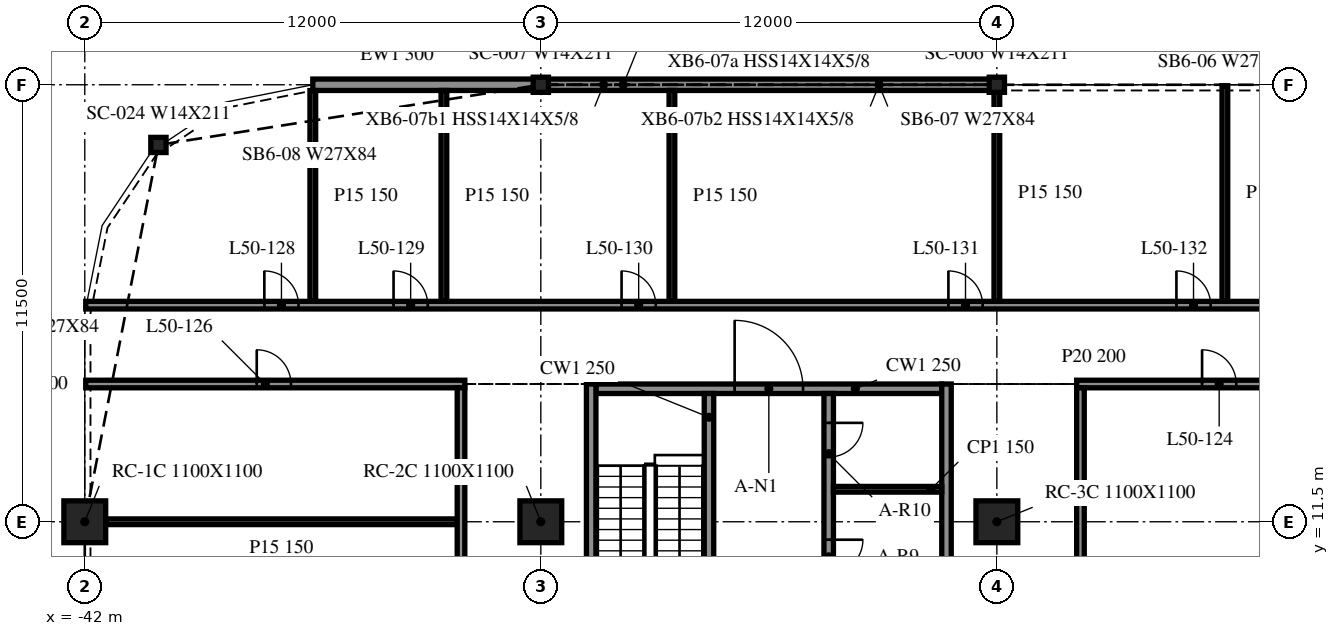
"""IFC4 building model, lengths in metres.
Left out: names, types, materials, properties, quantities, classifications, styles, units other than length and angle.
Written with IfcOpenShell. Run it as: python <this file> out.ifc"""

import sys

from ifc_helpers import new_model, si_unit, direction, frame, frame_2d, origin, origin_2d, place, context, subcontext, project, spatial, rectangle, i_section, extrude, element, fill, save


model = new_model("IFC4")
c1 = context("Model", 3, precision=1e-05, world=origin(), true_north=direction((0.0, 1.0)))
c2 = subcontext(c1, "Body", "Model", "MODEL_VIEW")
j1 = project(units=[si_unit("LENGTHUNIT", "METRE"), si_unit("PLANEANGLEUNIT", "RADIAN")], contexts=[c1])
p1 = place(None, origin())
s1 = spatial("IfcSite", under=j1, at=p1, CompositionType="ELEMENT")
p2 = place(p1, origin())
s2 = spatial("IfcBuilding", under=s1, at=p2, CompositionType="ELEMENT")
p3 = place(p2, frame((0.0, 0.0, 209.1)))
s3 = spatial("IfcBuildingStorey", under=s2, at=p3, CompositionType="ELEMENT", Elevation=209.1)
for number, where, z_axis, x_axis in (
    (1, (-42.0, 11.5, -0.34), (0.0, 0.0, 1.0), (1.0, 0.0, 0.0)),
    (2, (-30.0, 11.5, -0.34), (0.0, 0.0, 1.0), (1.0, 0.0, 0.0)),
    (3, (-18.0, 11.5, -0.34), (0.0, 0.0, 1.0), (1.0, 0.0, 0.0)),
):
    element("IfcColumn", number, at=place(p3, frame(where, z_axis=z_axis, x_axis=x_axis)), inside=s3, PredefinedType="COLUMN", context=c2, shape_type="SweptSolid", body=[
        extrude(rectangle(XDim=1.1, YDim=1.1, at=origin_2d()), origin(), (0.0, 0.0, 1.0), 3.8),
    ])
for number, where, z_axis, x_axis in (
    (4, (-18.0, 23.0, -0.34), (0.0, 0.0, 1.0), (1.0, 0.0, 0.0)),
    (5, (-30.0, 23.0, -0.34), (0.0, 0.0, 1.0), (1.0, 0.0, 0.0)),
    (6, (-40.062, 21.416, -0.34), (0.0, 0.0, 1.0), (1.0, 0.0, 0.0)),
):
    element("IfcColumn", number, at=place(p3, frame(where, z_axis=z_axis, x_axis=x_axis)), inside=s3, PredefinedType="COLUMN", context=c2, shape_type="SweptSolid", body=[
        extrude(i_section(OverallWidth=0.401, OverallDepth=0.399, WebThickness=0.025, FlangeThickness=0.04, at=origin_2d()), origin(), (0.0, 0.0, 1.0), 3.8),
    ])
p4 = place(p3, frame((-18.012, 23.0, 0.0), z_axis=(0.0, 0.0, 1.0), x_axis=(-1.0, 0.0, 0.0)))
e7 = element("IfcWall", 7, at=p4, inside=s3, PredefinedType="NOTDEFINED", context=c2, shape_type="SweptSolid", body=[
    extrude(rectangle(XDim=11.975, YDim=0.3, at=frame_2d((5.988, 0.0))), origin(), (0.0, 0.0, 1.0), 2.782),
])
p5 = place(p3, frame((-30.012, 23.0, 0.0), z_axis=(0.0, 0.0, 1.0), x_axis=(-1.0, 0.0, 0.0)))
e8 = element("IfcWall", 8, at=p5, inside=s3, PredefinedType="NOTDEFINED", context=c2, shape_type="SweptSolid", body=[
    extrude(rectangle(XDim=5.988, YDim=0.3, at=frame_2d((2.994, 0.0))), origin(), (0.0, 0.0, 1.0), 2.782),
])
for number, where, z_axis, x_axis in (
    (9, (-28.675, 15.125, 0.0), (0.0, 0.0, 1.0), (0.0, -1.0, 0.0)),
    (10, (-19.325, -9.125, 0.0), (0.0, 0.0, 1.0), (0.0, 1.0, 0.0)),
):
    element("IfcWall", number, at=place(p3, frame(where, z_axis=z_axis, x_axis=x_axis)), inside=s3, PredefinedType="SOLIDWALL", context=c2, shape_type="SweptSolid", body=[
        extrude(rectangle(XDim=24.25, YDim=0.25, at=frame_2d((12.125, 0.0))), origin(), (0.0, 0.0, 1.0), 3.46),
    ])
p6 = place(p3, frame((-28.55, 15.0, 0.0), z_axis=(0.0, 0.0, 1.0), x_axis=(1.0, 0.0, 0.0)))
e11 = element("IfcWall", 11, at=p6, inside=s3, PredefinedType="SOLIDWALL", context=c2, shape_type="SweptSolid", body=[
    extrude(rectangle(XDim=9.1, YDim=0.25, at=frame_2d((4.55, 0.0))), origin(), (0.0, 0.0, 1.0), 3.46),
])
p7 = place(p6, frame((3.65, 0.0, 0.0)))
e12 = element("IfcOpeningElement", 12, at=p7, cuts=e11, PredefinedType="OPENING", context=c2, shape_type="SweptSolid", body=[
    extrude(rectangle(XDim=1.8, YDim=2.1, at=frame_2d((0.9, 1.05))), frame((0.0, 0.135, 0.0), z_axis=(0.0, -1.0, 0.0), x_axis=(1.0, 0.0, 0.0)), (0.0, 0.0, 1.0), 0.27),
])
p8 = place(p3, frame((-25.575, 14.875, 0.0), z_axis=(0.0, 0.0, 1.0), x_axis=(0.0, -1.0, 0.0)))
e13 = element("IfcWall", 13, at=p8, inside=s3, PredefinedType="SOLIDWALL", context=c2, shape_type="SweptSolid", body=[
    extrude(rectangle(XDim=6.25, YDim=0.25, at=frame_2d((3.125, 0.0))), origin(), (0.0, 0.0, 1.0), 3.46),
])
p9 = place(p8, frame((4.85, 0.0, 0.0)))
e14 = element("IfcOpeningElement", 14, at=p9, cuts=e13, PredefinedType="OPENING", context=c2, shape_type="SweptSolid", body=[
    extrude(rectangle(XDim=1.0, YDim=2.1, at=frame_2d((0.5, 1.05))), frame((0.0, 0.135, 0.0), z_axis=(0.0, -1.0, 0.0), x_axis=(1.0, 0.0, 0.0)), (0.0, 0.0, 1.0), 0.27),
])
p10 = place(p3, frame((-22.425, 14.875, 0.0), z_axis=(0.0, 0.0, 1.0), x_axis=(0.0, -1.0, 0.0)))
e15 = element("IfcWall", 15, at=p10, inside=s3, PredefinedType="SOLIDWALL", context=c2, shape_type="SweptSolid", body=[
    extrude(rectangle(XDim=23.75, YDim=0.25, at=frame_2d((11.875, 0.0))), origin(), (0.0, 0.0, 1.0), 3.46),
])
p11 = place(p10, frame((15.225, 0.0, 0.0)))
e16 = element("IfcOpeningElement", 16, at=p11, cuts=e15, PredefinedType="OPENING", context=c2, shape_type="SweptSolid", body=[
    extrude(rectangle(XDim=0.9, YDim=2.1, at=frame_2d((0.45, 1.05))), frame((0.0, 0.135, 0.0), z_axis=(0.0, -1.0, 0.0), x_axis=(1.0, 0.0, 0.0)), (0.0, 0.0, 1.0), 0.27),
])
p12 = place(p10, frame((11.425, 0.0, 0.0)))
e17 = element("IfcOpeningElement", 17, at=p12, cuts=e15, PredefinedType="OPENING", context=c2, shape_type="SweptSolid", body=[
    extrude(rectangle(XDim=0.9, YDim=2.1, at=frame_2d((0.45, 1.05))), frame((0.0, 0.135, 0.0), z_axis=(0.0, -1.0, 0.0), x_axis=(1.0, 0.0, 0.0)), (0.0, 0.0, 1.0), 0.27),
])
p13 = place(p10, frame((7.625, 0.0, 0.0)))
e18 = element("IfcOpeningElement", 18, at=p13, cuts=e15, PredefinedType="OPENING", context=c2, shape_type="SweptSolid", body=[
    extrude(rectangle(XDim=0.9, YDim=2.1, at=frame_2d((0.45, 1.05))), frame((0.0, 0.135, 0.0), z_axis=(0.0, -1.0, 0.0), x_axis=(1.0, 0.0, 0.0)), (0.0, 0.0, 1.0), 0.27),
])
p14 = place(p10, frame((20.3, 0.0, 0.0)))
e19 = element("IfcOpeningElement", 19, at=p14, cuts=e15, PredefinedType="OPENING", context=c2, shape_type="SweptSolid", body=[
    extrude(rectangle(XDim=0.9, YDim=2.1, at=frame_2d((0.45, 1.05))), frame((0.0, 0.135, 0.0), z_axis=(0.0, -1.0, 0.0), x_axis=(1.0, 0.0, 0.0)), (0.0, 0.0, 1.0), 0.27),
])
p15 = place(p10, frame((3.847, 0.0, 0.0)))
e20 = element("IfcOpeningElement", 20, at=p15, cuts=e15, PredefinedType="OPENING", context=c2, shape_type="SweptSolid", body=[
    extrude(rectangle(XDim=0.9, YDim=2.1, at=frame_2d((0.45, 1.05))), frame((0.0, 0.135, 0.0), z_axis=(0.0, -1.0, 0.0), x_axis=(1.0, 0.0, 0.0)), (0.0, 0.0, 1.0), 0.27),
])
p16 = place(p10, frame((0.772, 0.0, 0.0)))
e21 = element("IfcOpeningElement", 21, at=p16, cuts=e15, PredefinedType="OPENING", context=c2, shape_type="SweptSolid", body=[
    extrude(rectangle(XDim=0.9, YDim=2.1, at=frame_2d((0.45, 1.05))), frame((0.0, 0.135, 0.0), z_axis=(0.0, -1.0, 0.0), x_axis=(1.0, 0.0, 0.0)), (0.0, 0.0, 1.0), 0.27),
])
p17 = place(p3, frame((-22.3, 12.355, 0.0), z_axis=(0.0, 0.0, 1.0), x_axis=(1.0, 0.0, 0.0)))
e22 = element("IfcWall", 22, at=p17, inside=s3, PredefinedType="PARTITIONING", context=c2, shape_type="SweptSolid", body=[
    extrude(rectangle(XDim=2.85, YDim=0.15, at=frame_2d((1.425, 0.0))), origin(), (0.0, 0.0, 1.0), 3.46),
])
p18 = place(p3, frame((-41.45, 11.5, 0.0), z_axis=(0.0, 0.0, 1.0), x_axis=(1.0, 0.0, 0.0)))
e23 = element("IfcWall", 23, at=p18, inside=s3, PredefinedType="PARTITIONING", context=c2, shape_type="SweptSolid", body=[
    extrude(rectangle(XDim=9.25, YDim=0.15, at=frame_2d((4.625, 0.0))), origin(), (0.0, 0.0, 1.0), 3.46),
])
p19 = place(p3, frame((-41.975, 15.125, 0.0), z_axis=(0.0, 0.0, 1.0), x_axis=(1.0, 0.0, 0.0)))
e24 = element("IfcWall", 24, at=p19, inside=s3, PredefinedType="PARTITIONING", context=c2, shape_type="SweptSolid", body=[
    extrude(rectangle(XDim=9.975, YDim=0.2, at=frame_2d((4.988, 0.0))), origin(), (0.0, 0.0, 1.0), 3.46),
])
p20 = place(p19, frame((4.5, 0.0, 0.0)))
e25 = element("IfcOpeningElement", 25, at=p20, cuts=e24, PredefinedType="OPENING", context=c2, shape_type="SweptSolid", body=[
    extrude(rectangle(XDim=0.9, YDim=2.1, at=frame_2d((0.45, 1.05))), frame((0.0, 0.11, 0.0), z_axis=(0.0, -1.0, 0.0), x_axis=(1.0, 0.0, 0.0)), (0.0, 0.0, 1.0), 0.22),
])
p21 = place(p3, frame((-15.9, 15.125, 0.0), z_axis=(0.0, 0.0, 1.0), x_axis=(1.0, 0.0, 0.0)))
e26 = element("IfcWall", 26, at=p21, inside=s3, PredefinedType="PARTITIONING", context=c2, shape_type="SweptSolid", body=[
    extrude(rectangle(XDim=7.7, YDim=0.2, at=frame_2d((3.85, 0.0))), origin(), (0.0, 0.0, 1.0), 3.46),
])
p22 = place(p21, frame((3.3, 0.0, 0.0)))
e27 = element("IfcOpeningElement", 27, at=p22, cuts=e26, PredefinedType="OPENING", context=c2, shape_type="SweptSolid", body=[
    extrude(rectangle(XDim=0.9, YDim=2.1, at=frame_2d((0.45, 1.05))), frame((0.0, 0.11, 0.0), z_axis=(0.0, -1.0, 0.0), x_axis=(1.0, 0.0, 0.0)), (0.0, 0.0, 1.0), 0.22),
])
p23 = place(p3, frame((-41.975, 17.2, 0.0), z_axis=(0.0, 0.0, 1.0), x_axis=(1.0, 0.0, 0.0)))
e28 = element("IfcWall", 28, at=p23, inside=s3, PredefinedType="PARTITIONING", context=c2, shape_type="SweptSolid", body=[
    extrude(rectangle(XDim=95.782, YDim=0.2, at=frame_2d((47.891, 0.0))), origin(), (0.0, 0.0, 1.0), 3.46),
])
p24 = place(p23, frame((4.7, 0.0, 0.0)))
e29 = element("IfcOpeningElement", 29, at=p24, cuts=e28, PredefinedType="OPENING", context=c2, shape_type="SweptSolid", body=[
    extrude(rectangle(XDim=0.9, YDim=2.1, at=frame_2d((0.45, 1.05))), frame((0.0, 0.11, 0.0), z_axis=(0.0, -1.0, 0.0), x_axis=(1.0, 0.0, 0.0)), (0.0, 0.0, 1.0), 0.22),
])
p25 = place(p23, frame((8.1, 0.0, 0.0)))
e30 = element("IfcOpeningElement", 30, at=p25, cuts=e28, PredefinedType="OPENING", context=c2, shape_type="SweptSolid", body=[
    extrude(rectangle(XDim=0.9, YDim=2.1, at=frame_2d((0.45, 1.05))), frame((0.0, 0.11, 0.0), z_axis=(0.0, -1.0, 0.0), x_axis=(1.0, 0.0, 0.0)), (0.0, 0.0, 1.0), 0.22),
])
p26 = place(p23, frame((14.1, 0.0, 0.0)))
e31 = element("IfcOpeningElement", 31, at=p26, cuts=e28, PredefinedType="OPENING", context=c2, shape_type="SweptSolid", body=[
    extrude(rectangle(XDim=0.9, YDim=2.1, at=frame_2d((0.45, 1.05))), frame((0.0, 0.11, 0.0), z_axis=(0.0, -1.0, 0.0), x_axis=(1.0, 0.0, 0.0)), (0.0, 0.0, 1.0), 0.22),
])
p27 = place(p23, frame((22.7, 0.0, 0.0)))
e32 = element("IfcOpeningElement", 32, at=p27, cuts=e28, PredefinedType="OPENING", context=c2, shape_type="SweptSolid", body=[
    extrude(rectangle(XDim=0.9, YDim=2.1, at=frame_2d((0.45, 1.05))), frame((0.0, 0.11, 0.0), z_axis=(0.0, -1.0, 0.0), x_axis=(1.0, 0.0, 0.0)), (0.0, 0.0, 1.0), 0.22),
])
p28 = place(p23, frame((28.7, 0.0, 0.0)))
e33 = element("IfcOpeningElement", 33, at=p28, cuts=e28, PredefinedType="OPENING", context=c2, shape_type="SweptSolid", body=[
    extrude(rectangle(XDim=0.9, YDim=2.1, at=frame_2d((0.45, 1.05))), frame((0.0, 0.11, 0.0), z_axis=(0.0, -1.0, 0.0), x_axis=(1.0, 0.0, 0.0)), (0.0, 0.0, 1.0), 0.22),
])
p29 = place(p23, frame((34.7, 0.0, 0.0)))
e34 = element("IfcOpeningElement", 34, at=p29, cuts=e28, PredefinedType="OPENING", context=c2, shape_type="SweptSolid", body=[
    extrude(rectangle(XDim=0.9, YDim=2.1, at=frame_2d((0.45, 1.05))), frame((0.0, 0.11, 0.0), z_axis=(0.0, -1.0, 0.0), x_axis=(1.0, 0.0, 0.0)), (0.0, 0.0, 1.0), 0.22),
])
p30 = place(p23, frame((38.1, 0.0, 0.0)))
e35 = element("IfcOpeningElement", 35, at=p30, cuts=e28, PredefinedType="OPENING", context=c2, shape_type="SweptSolid", body=[
    extrude(rectangle(XDim=0.9, YDim=2.1, at=frame_2d((0.45, 1.05))), frame((0.0, 0.11, 0.0), z_axis=(0.0, -1.0, 0.0), x_axis=(1.0, 0.0, 0.0)), (0.0, 0.0, 1.0), 0.22),
])
p31 = place(p23, frame((43.7, 0.0, 0.0)))
e36 = element("IfcOpeningElement", 36, at=p31, cuts=e28, PredefinedType="OPENING", context=c2, shape_type="SweptSolid", body=[
    extrude(rectangle(XDim=0.9, YDim=2.1, at=frame_2d((0.45, 1.05))), frame((0.0, 0.11, 0.0), z_axis=(0.0, -1.0, 0.0), x_axis=(1.0, 0.0, 0.0)), (0.0, 0.0, 1.0), 0.22),
])
p32 = place(p23, frame((47.3, 0.0, 0.0)))
e37 = element("IfcOpeningElement", 37, at=p32, cuts=e28, PredefinedType="OPENING", context=c2, shape_type="SweptSolid", body=[
    extrude(rectangle(XDim=0.9, YDim=2.1, at=frame_2d((0.45, 1.05))), frame((0.0, 0.11, 0.0), z_axis=(0.0, -1.0, 0.0), x_axis=(1.0, 0.0, 0.0)), (0.0, 0.0, 1.0), 0.22),
])
p33 = place(p23, frame((54.1, 0.0, 0.0)))
e38 = element("IfcOpeningElement", 38, at=p33, cuts=e28, PredefinedType="OPENING", context=c2, shape_type="SweptSolid", body=[
    extrude(rectangle(XDim=0.9, YDim=2.1, at=frame_2d((0.45, 1.05))), frame((0.0, 0.11, 0.0), z_axis=(0.0, -1.0, 0.0), x_axis=(1.0, 0.0, 0.0)), (0.0, 0.0, 1.0), 0.22),
])
p34 = place(p23, frame((60.1, 0.0, 0.0)))
e39 = element("IfcOpeningElement", 39, at=p34, cuts=e28, PredefinedType="OPENING", context=c2, shape_type="SweptSolid", body=[
    extrude(rectangle(XDim=0.9, YDim=2.1, at=frame_2d((0.45, 1.05))), frame((0.0, 0.11, 0.0), z_axis=(0.0, -1.0, 0.0), x_axis=(1.0, 0.0, 0.0)), (0.0, 0.0, 1.0), 0.22),
])
p35 = place(p23, frame((66.1, 0.0, 0.0)))
e40 = element("IfcOpeningElement", 40, at=p35, cuts=e28, PredefinedType="OPENING", context=c2, shape_type="SweptSolid", body=[
    extrude(rectangle(XDim=0.9, YDim=2.1, at=frame_2d((0.45, 1.05))), frame((0.0, 0.11, 0.0), z_axis=(0.0, -1.0, 0.0), x_axis=(1.0, 0.0, 0.0)), (0.0, 0.0, 1.0), 0.22),
])
p36 = place(p23, frame((69.5, 0.0, 0.0)))
e41 = element("IfcOpeningElement", 41, at=p36, cuts=e28, PredefinedType="OPENING", context=c2, shape_type="SweptSolid", body=[
    extrude(rectangle(XDim=0.9, YDim=2.1, at=frame_2d((0.45, 1.05))), frame((0.0, 0.11, 0.0), z_axis=(0.0, -1.0, 0.0), x_axis=(1.0, 0.0, 0.0)), (0.0, 0.0, 1.0), 0.22),
])
p37 = place(p23, frame((75.1, 0.0, 0.0)))
e42 = element("IfcOpeningElement", 42, at=p37, cuts=e28, PredefinedType="OPENING", context=c2, shape_type="SweptSolid", body=[
    extrude(rectangle(XDim=0.9, YDim=2.1, at=frame_2d((0.45, 1.05))), frame((0.0, 0.11, 0.0), z_axis=(0.0, -1.0, 0.0), x_axis=(1.0, 0.0, 0.0)), (0.0, 0.0, 1.0), 0.22),
])
p38 = place(p23, frame((84.1, 0.0, 0.0)))
e43 = element("IfcOpeningElement", 43, at=p38, cuts=e28, PredefinedType="OPENING", context=c2, shape_type="SweptSolid", body=[
    extrude(rectangle(XDim=0.9, YDim=2.1, at=frame_2d((0.45, 1.05))), frame((0.0, 0.11, 0.0), z_axis=(0.0, -1.0, 0.0), x_axis=(1.0, 0.0, 0.0)), (0.0, 0.0, 1.0), 0.22),
])
p39 = place(p23, frame((90.1, 0.0, 0.0)))
e44 = element("IfcOpeningElement", 44, at=p39, cuts=e28, PredefinedType="OPENING", context=c2, shape_type="SweptSolid", body=[
    extrude(rectangle(XDim=0.9, YDim=2.1, at=frame_2d((0.45, 1.05))), frame((0.0, 0.11, 0.0), z_axis=(0.0, -1.0, 0.0), x_axis=(1.0, 0.0, 0.0)), (0.0, 0.0, 1.0), 0.22),
])
p40 = place(p3, frame((-36.0, 17.3, 0.0), z_axis=(0.0, 0.0, 1.0), x_axis=(0.0, 1.0, 0.0)))
e45 = element("IfcWall", 45, at=p40, inside=s3, PredefinedType="PARTITIONING", context=c2, shape_type="SweptSolid", body=[
    extrude(rectangle(XDim=5.547, YDim=0.15, at=frame_2d((2.773, 0.0))), origin(), (0.0, 0.0, 1.0), 3.46),
])
p41 = place(p3, frame((-32.55, 17.3, 0.0), z_axis=(0.0, 0.0, 1.0), x_axis=(0.0, 1.0, 0.0)))
e46 = element("IfcWall", 46, at=p41, inside=s3, PredefinedType="PARTITIONING", context=c2, shape_type="SweptSolid", body=[
    extrude(rectangle(XDim=5.55, YDim=0.15, at=frame_2d((2.775, 0.0))), origin(), (0.0, 0.0, 1.0), 3.46),
])
p42 = place(p3, frame((-32.1, -9.025, 0.0), z_axis=(0.0, 0.0, 1.0), x_axis=(0.0, 1.0, 0.0)))
e47 = element("IfcWall", 47, at=p42, inside=s3, PredefinedType="PARTITIONING", context=c2, shape_type="SweptSolid", body=[
    extrude(rectangle(XDim=24.05, YDim=0.2, at=frame_2d((12.025, 0.0))), origin(), (0.0, 0.0, 1.0), 3.46),
])
p43 = place(p42, frame((11.5, 0.0, 0.0)))
e48 = element("IfcOpeningElement", 48, at=p43, cuts=e47, PredefinedType="OPENING", context=c2, shape_type="SweptSolid", body=[
    extrude(rectangle(XDim=1.0, YDim=2.1, at=frame_2d((0.5, 1.05))), frame((0.0, 0.11, 0.0), z_axis=(0.0, -1.0, 0.0), x_axis=(1.0, 0.0, 0.0)), (0.0, 0.0, 1.0), 0.22),
])
p44 = place(p3, frame((-26.55, 17.3, 0.0), z_axis=(0.0, 0.0, 1.0), x_axis=(0.0, 1.0, 0.0)))
e49 = element("IfcWall", 49, at=p44, inside=s3, PredefinedType="PARTITIONING", context=c2, shape_type="SweptSolid", body=[
    extrude(rectangle(XDim=5.55, YDim=0.15, at=frame_2d((2.775, 0.0))), origin(), (0.0, 0.0, 1.0), 3.46),
])
p45 = place(p3, frame((-18.0, 17.3, 0.0), z_axis=(0.0, 0.0, 1.0), x_axis=(0.0, 1.0, 0.0)))
e50 = element("IfcWall", 50, at=p45, inside=s3, PredefinedType="PARTITIONING", context=c2, shape_type="SweptSolid", body=[
    extrude(rectangle(XDim=5.675, YDim=0.15, at=frame_2d((2.837, 0.0))), origin(), (0.0, 0.0, 1.0), 3.46),
])
p46 = place(p3, frame((-15.8, -9.025, 0.0), z_axis=(0.0, 0.0, 1.0), x_axis=(0.0, 1.0, 0.0)))
e51 = element("IfcWall", 51, at=p46, inside=s3, PredefinedType="PARTITIONING", context=c2, shape_type="SweptSolid", body=[
    extrude(rectangle(XDim=24.05, YDim=0.2, at=frame_2d((12.025, 0.0))), origin(), (0.0, 0.0, 1.0), 3.46),
])
p47 = place(p46, frame((11.5, 0.0, 0.0)))
e52 = element("IfcOpeningElement", 52, at=p47, cuts=e51, PredefinedType="OPENING", context=c2, shape_type="SweptSolid", body=[
    extrude(rectangle(XDim=0.9, YDim=2.1, at=frame_2d((0.45, 1.05))), frame((0.0, 0.11, 0.0), z_axis=(0.0, -1.0, 0.0), x_axis=(1.0, 0.0, 0.0)), (0.0, 0.0, 1.0), 0.22),
])
p48 = place(p3, frame((-12.0, 17.3, 0.0), z_axis=(0.0, 0.0, 1.0), x_axis=(0.0, 1.0, 0.0)))
e53 = element("IfcWall", 53, at=p48, inside=s3, PredefinedType="PARTITIONING", context=c2, shape_type="SweptSolid", body=[
    extrude(rectangle(XDim=5.675, YDim=0.15, at=frame_2d((2.837, 0.0))), origin(), (0.0, 0.0, 1.0), 3.46),
])
p49 = place(p7, origin())
e54 = element("IfcDoor", 54, at=p49, inside=s3, OperationType="DOUBLE_DOOR_SINGLE_SWING", PredefinedType="DOOR", context=c2, shape_type="SweptSolid", body=[
    extrude(rectangle(XDim=1.8, YDim=2.1, at=frame_2d((0.9, 1.05))), frame((0.0, 0.025, 0.0), z_axis=(0.0, -1.0, 0.0), x_axis=(1.0, 0.0, 0.0)), (0.0, 0.0, 1.0), 0.05),
])
fill(e12, e54)
p50 = place(p15, origin())
e55 = element("IfcDoor", 55, at=p50, inside=s3, OperationType="SINGLE_SWING_LEFT", PredefinedType="DOOR", context=c2, shape_type="SweptSolid", body=[
    extrude(rectangle(XDim=0.9, YDim=2.1, at=frame_2d((0.45, 1.05))), frame((0.0, 0.025, 0.0), z_axis=(0.0, -1.0, 0.0), x_axis=(1.0, 0.0, 0.0)), (0.0, 0.0, 1.0), 0.05),
])
fill(e20, e55)
p51 = place(p16, origin())
e56 = element("IfcDoor", 56, at=p51, inside=s3, OperationType="SINGLE_SWING_RIGHT", PredefinedType="DOOR", context=c2, shape_type="SweptSolid", body=[
    extrude(rectangle(XDim=0.9, YDim=2.1, at=frame_2d((0.45, 1.05))), frame((0.0, 0.025, 0.0), z_axis=(0.0, -1.0, 0.0), x_axis=(1.0, 0.0, 0.0)), (0.0, 0.0, 1.0), 0.05),
])
fill(e21, e56)
p52 = place(p22, origin())
e57 = element("IfcDoor", 57, at=p52, inside=s3, OperationType="SINGLE_SWING_RIGHT", PredefinedType="DOOR", context=c2, shape_type="SweptSolid", body=[
    extrude(rectangle(XDim=0.9, YDim=2.1, at=frame_2d((0.45, 1.05))), frame((0.0, 0.025, 0.0), z_axis=(0.0, -1.0, 0.0), x_axis=(1.0, 0.0, 0.0)), (0.0, 0.0, 1.0), 0.05),
])
fill(e27, e57)
p53 = place(p20, origin())
e58 = element("IfcDoor", 58, at=p53, inside=s3, OperationType="SINGLE_SWING_LEFT", PredefinedType="DOOR", context=c2, shape_type="SweptSolid", body=[
    extrude(rectangle(XDim=0.9, YDim=2.1, at=frame_2d((0.45, 1.05))), frame((0.0, 0.025, 0.0), z_axis=(0.0, -1.0, 0.0), x_axis=(1.0, 0.0, 0.0)), (0.0, 0.0, 1.0), 0.05),
])
fill(e25, e58)
p54 = place(p24, origin())
e59 = element("IfcDoor", 59, at=p54, inside=s3, OperationType="SINGLE_SWING_LEFT", PredefinedType="DOOR", context=c2, shape_type="SweptSolid", body=[
    extrude(rectangle(XDim=0.9, YDim=2.1, at=frame_2d((0.45, 1.05))), frame((0.0, 0.025, 0.0), z_axis=(0.0, -1.0, 0.0), x_axis=(1.0, 0.0, 0.0)), (0.0, 0.0, 1.0), 0.05),
])
fill(e29, e59)
p55 = place(p25, origin())
e60 = element("IfcDoor", 60, at=p55, inside=s3, OperationType="SINGLE_SWING_LEFT", PredefinedType="DOOR", context=c2, shape_type="SweptSolid", body=[
    extrude(rectangle(XDim=0.9, YDim=2.1, at=frame_2d((0.45, 1.05))), frame((0.0, 0.025, 0.0), z_axis=(0.0, -1.0, 0.0), x_axis=(1.0, 0.0, 0.0)), (0.0, 0.0, 1.0), 0.05),
])
fill(e30, e60)
p56 = place(p26, origin())
e61 = element("IfcDoor", 61, at=p56, inside=s3, OperationType="SINGLE_SWING_LEFT", PredefinedType="DOOR", context=c2, shape_type="SweptSolid", body=[
    extrude(rectangle(XDim=0.9, YDim=2.1, at=frame_2d((0.45, 1.05))), frame((0.0, 0.025, 0.0), z_axis=(0.0, -1.0, 0.0), x_axis=(1.0, 0.0, 0.0)), (0.0, 0.0, 1.0), 0.05),
])
fill(e31, e61)
p57 = place(p27, origin())
e62 = element("IfcDoor", 62, at=p57, inside=s3, OperationType="SINGLE_SWING_LEFT", PredefinedType="DOOR", context=c2, shape_type="SweptSolid", body=[
    extrude(rectangle(XDim=0.9, YDim=2.1, at=frame_2d((0.45, 1.05))), frame((0.0, 0.025, 0.0), z_axis=(0.0, -1.0, 0.0), x_axis=(1.0, 0.0, 0.0)), (0.0, 0.0, 1.0), 0.05),
])
fill(e32, e62)
p58 = place(p28, origin())
e63 = element("IfcDoor", 63, at=p58, inside=s3, OperationType="SINGLE_SWING_LEFT", PredefinedType="DOOR", context=c2, shape_type="SweptSolid", body=[
    extrude(rectangle(XDim=0.9, YDim=2.1, at=frame_2d((0.45, 1.05))), frame((0.0, 0.025, 0.0), z_axis=(0.0, -1.0, 0.0), x_axis=(1.0, 0.0, 0.0)), (0.0, 0.0, 1.0), 0.05),
])
fill(e33, e63)
save(model, sys.argv[1])
